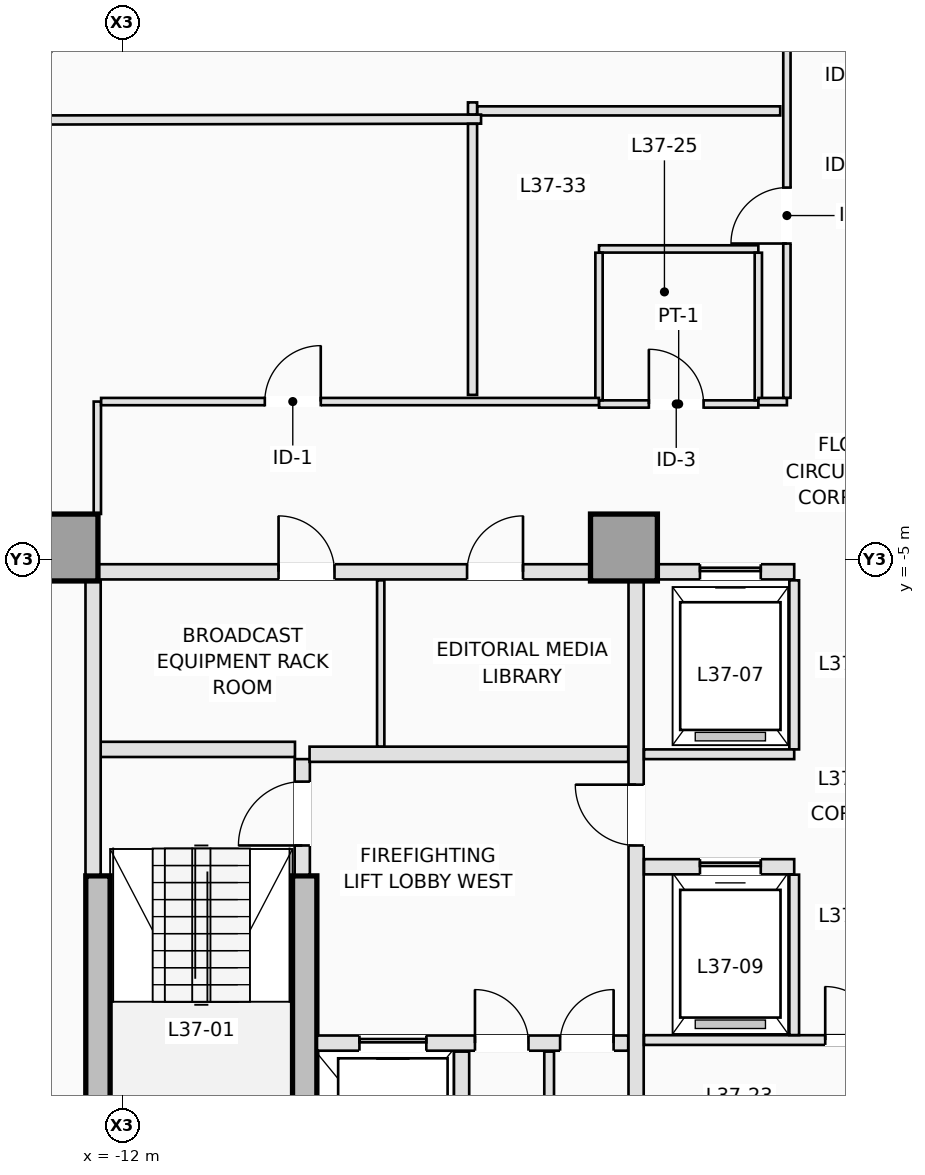
"""IFC4 building model, lengths in metres.
Left out: names, types, materials, properties, quantities, classifications, styles, units other than length and angle.
Written with IfcOpenShell. Run it as: python <this file> out.ifc"""

import sys

from ifc_helpers import new_model, si_unit, direction, frame, frame_2d, origin, origin_2d, place, context, subcontext, project, spatial, rectangle, extrude, element, fill, save


model = new_model("IFC4")
c1 = context("Model", 3, precision=1e-05, world=origin(), true_north=direction((0.0, 1.0)))
c2 = subcontext(c1, "Body", "Model", "MODEL_VIEW")
j1 = project(units=[si_unit("LENGTHUNIT", "METRE"), si_unit("PLANEANGLEUNIT", "RADIAN")], contexts=[c1])
p1 = place(None, origin())
s1 = spatial("IfcSite", under=j1, at=p1, CompositionType="ELEMENT")
p2 = place(p1, origin())
s2 = spatial("IfcBuilding", under=s1, at=p2, CompositionType="ELEMENT")
p3 = place(p2, frame((0.0, 0.0, 137.0)))
s3 = spatial("IfcBuildingStorey", under=s2, at=p3, CompositionType="ELEMENT", Elevation=137.0)
p4 = place(p3, frame((-12.4, -15.7, 0.0), z_axis=(0.0, 0.0, 1.0), x_axis=(0.0, 1.0, 0.0)))
e1 = element("IfcWall", 1, at=p4, inside=s3, PredefinedType="SHEAR", context=c2, shape_type="SweptSolid", body=[
    extrude(rectangle(XDim=5.5, YDim=0.4, at=frame_2d((2.75, 0.0))), origin(), (0.0, 0.0, 1.0), 3.5),
])
p5 = place(p3, frame((-9.0, -16.15, 0.0), z_axis=(0.0, 0.0, 1.0), x_axis=(0.0, 1.0, 0.0)))
e2 = element("IfcWall", 2, at=p5, inside=s3, PredefinedType="SHEAR", context=c2, shape_type="SweptSolid", body=[
    extrude(rectangle(XDim=5.95, YDim=0.4, at=frame_2d((2.975, 0.0))), origin(), (0.0, 0.0, 1.0), 3.5),
])
for number, where, z_axis, x_axis in (
    (3, (-12.95, -4.8, 0.0), (0.0, 0.0, 1.0), (1.0, 0.0, 0.0)),
    (4, (-3.75, -4.8, 0.0), (0.0, 0.0, 1.0), (1.0, 0.0, 0.0)),
):
    element("IfcColumn", number, at=place(p3, frame(where, z_axis=z_axis, x_axis=x_axis)), inside=s3, PredefinedType="COLUMN", context=c2, shape_type="SweptSolid", body=[
        extrude(rectangle(XDim=1.1, YDim=1.1, at=origin_2d()), origin(), (0.0, 0.0, 1.0), 3.5),
    ])
p6 = place(p3, frame((-15.383, -0.305, 0.0), z_axis=(0.0, 0.0, 1.0), x_axis=(0.490232095789, 0.871591929895, 0.0)))
e5 = element("IfcWall", 5, at=p6, inside=s3, PredefinedType="STANDARD", context=c2, shape_type="SweptSolid", body=[
    extrude(rectangle(XDim=4.375, YDim=0.28, at=frame_2d((2.188, 0.0))), origin(), (0.0, 0.0, 1.0), 3.25),
])
p7 = place(p3, frame((-9.04, -10.18, 0.0), z_axis=(0.0, 0.0, 1.0), x_axis=(0.0, 1.0, 0.0)))
e6 = element("IfcWall", 6, at=p7, inside=s3, PredefinedType="PARTITIONING", context=c2, shape_type="SweptSolid", body=[
    extrude(rectangle(XDim=1.9, YDim=0.25, at=frame_2d((0.95, 0.0))), origin(), (0.0, 0.0, 1.0), 3.25),
])
p8 = place(p7, frame((0.48, 0.0, 0.0)))
e7 = element("IfcOpeningElement", 7, at=p8, cuts=e6, PredefinedType="OPENING", context=c2, shape_type="SweptSolid", body=[
    extrude(rectangle(XDim=1.05, YDim=2.15, at=frame_2d((0.525, 1.075))), frame((0.0, 0.135, 0.0), z_axis=(0.0, -1.0, 0.0), x_axis=(1.0, 0.0, 0.0)), (0.0, 0.0, 1.0), 0.27),
])
p9 = place(p3, frame((-12.38, -8.12, 0.0), z_axis=(0.0, 0.0, 1.0), x_axis=(1.0, 0.0, 0.0)))
e8 = element("IfcWall", 8, at=p9, inside=s3, PredefinedType="PARTITIONING", context=c2, shape_type="SweptSolid", body=[
    extrude(rectangle(XDim=3.22, YDim=0.25, at=frame_2d((1.61, 0.0))), origin(), (0.0, 0.0, 1.0), 3.25),
])
p10 = place(p3, frame((-12.48, -10.18, 0.0), z_axis=(0.0, 0.0, 1.0), x_axis=(0.0, 1.0, 0.0)))
e9 = element("IfcWall", 9, at=p10, inside=s3, PredefinedType="PARTITIONING", context=c2, shape_type="SweptSolid", body=[
    extrude(rectangle(XDim=4.828, YDim=0.25, at=frame_2d((2.414, 0.0))), origin(), (0.0, 0.0, 1.0), 3.25),
])
p11 = place(p3, frame((-8.798, -12.95, 0.0), z_axis=(0.0, 0.0, 1.0), x_axis=(1.0, 0.0, 0.0)))
e10 = element("IfcWall", 10, at=p11, inside=s3, PredefinedType="PARTITIONING", context=c2, shape_type="SweptSolid", body=[
    extrude(rectangle(XDim=5.118, YDim=0.25, at=frame_2d((2.559, 0.0))), origin(), (0.0, 0.0, 1.0), 3.25),
])
p12 = place(p11, frame((0.698, 0.0, 0.0)))
e11 = element("IfcOpeningElement", 11, at=p12, cuts=e10, PredefinedType="OPENING", context=c2, shape_type="SweptSolid", body=[
    extrude(rectangle(XDim=1.1, YDim=2.15, at=frame_2d((0.55, 1.075))), frame((0.0, 0.135, 0.0), z_axis=(0.0, -1.0, 0.0), x_axis=(1.0, 0.0, 0.0)), (0.0, 0.0, 1.0), 0.27),
])
p13 = place(p11, frame((2.598, 0.0, 0.0)))
e12 = element("IfcOpeningElement", 12, at=p13, cuts=e10, PredefinedType="OPENING", context=c2, shape_type="SweptSolid", body=[
    extrude(rectangle(XDim=0.88, YDim=2.1, at=frame_2d((0.44, 1.05))), frame((0.0, 0.135, 0.0), z_axis=(0.0, -1.0, 0.0), x_axis=(1.0, 0.0, 0.0)), (0.0, 0.0, 1.0), 0.27),
])
p14 = place(p11, frame((3.998, 0.0, 0.0)))
e13 = element("IfcOpeningElement", 13, at=p14, cuts=e10, PredefinedType="OPENING", context=c2, shape_type="SweptSolid", body=[
    extrude(rectangle(XDim=0.88, YDim=2.1, at=frame_2d((0.44, 1.05))), frame((0.0, 0.135, 0.0), z_axis=(0.0, -1.0, 0.0), x_axis=(1.0, 0.0, 0.0)), (0.0, 0.0, 1.0), 0.27),
])
p15 = place(p3, frame((-6.42, -15.92, 0.0), z_axis=(0.0, 0.0, 1.0), x_axis=(0.0, 1.0, 0.0)))
e14 = element("IfcWall", 14, at=p15, inside=s3, PredefinedType="PARTITIONING", context=c2, shape_type="SweptSolid", body=[
    extrude(rectangle(XDim=2.83, YDim=0.25, at=frame_2d((1.415, 0.0))), origin(), (0.0, 0.0, 1.0), 3.25),
])
p16 = place(p3, frame((-4.98, -15.92, 0.0), z_axis=(0.0, 0.0, 1.0), x_axis=(0.0, 1.0, 0.0)))
e15 = element("IfcWall", 15, at=p16, inside=s3, PredefinedType="PARTITIONING", context=c2, shape_type="SweptSolid", body=[
    extrude(rectangle(XDim=2.83, YDim=0.16, at=frame_2d((1.415, 0.0))), origin(), (0.0, 0.0, 1.0), 3.25),
])
p17 = place(p3, frame((-8.92, -8.2, 0.0), z_axis=(0.0, 0.0, 1.0), x_axis=(1.0, 0.0, 0.0)))
e16 = element("IfcWall", 16, at=p17, inside=s3, PredefinedType="PARTITIONING", context=c2, shape_type="SweptSolid", body=[
    extrude(rectangle(XDim=5.24, YDim=0.25, at=frame_2d((2.62, 0.0))), origin(), (0.0, 0.0, 1.0), 3.25),
])
p18 = place(p3, frame((-3.55, -15.798, 0.0), z_axis=(0.0, 0.0, 1.0), x_axis=(0.0, 1.0, 0.0)))
e17 = element("IfcWall", 17, at=p18, inside=s3, PredefinedType="PARTITIONING", context=c2, shape_type="SweptSolid", body=[
    extrude(rectangle(XDim=10.446, YDim=0.25, at=frame_2d((5.223, 0.0))), origin(), (0.0, 0.0, 1.0), 3.25),
])
p19 = place(p18, frame((6.098, 0.0, 0.0)))
e18 = element("IfcOpeningElement", 18, at=p19, cuts=e17, PredefinedType="OPENING", context=c2, shape_type="SweptSolid", body=[
    extrude(rectangle(XDim=1.0, YDim=2.15, at=frame_2d((0.5, 1.075))), frame((0.0, 0.135, 0.0), z_axis=(0.0, -1.0, 0.0), x_axis=(1.0, 0.0, 0.0)), (0.0, 0.0, 1.0), 0.27),
])
p20 = place(p3, frame((-12.398, -5.2, 0.0), z_axis=(0.0, 0.0, 1.0), x_axis=(1.0, 0.0, 0.0)))
e19 = element("IfcWall", 19, at=p20, inside=s3, PredefinedType="PARTITIONING", context=c2, shape_type="SweptSolid", body=[
    extrude(rectangle(XDim=8.096, YDim=0.25, at=frame_2d((4.048, 0.0))), origin(), (0.0, 0.0, 1.0), 3.25),
])
p21 = place(p20, frame((2.968, 0.0, 0.0)))
e20 = element("IfcOpeningElement", 20, at=p21, cuts=e19, PredefinedType="OPENING", context=c2, shape_type="SweptSolid", body=[
    extrude(rectangle(XDim=0.92, YDim=2.12, at=frame_2d((0.46, 1.06))), frame((0.0, 0.135, 0.0), z_axis=(0.0, -1.0, 0.0), x_axis=(1.0, 0.0, 0.0)), (0.0, 0.0, 1.0), 0.27),
])
p22 = place(p20, frame((6.068, 0.0, 0.0)))
e21 = element("IfcOpeningElement", 21, at=p22, cuts=e19, PredefinedType="OPENING", context=c2, shape_type="SweptSolid", body=[
    extrude(rectangle(XDim=0.92, YDim=2.12, at=frame_2d((0.46, 1.06))), frame((0.0, 0.135, 0.0), z_axis=(0.0, -1.0, 0.0), x_axis=(1.0, 0.0, 0.0)), (0.0, 0.0, 1.0), 0.27),
])
p23 = place(p3, frame((-3.198, -5.2, 0.0), z_axis=(0.0, 0.0, 1.0), x_axis=(1.0, 0.0, 0.0)))
e22 = element("IfcWall", 22, at=p23, inside=s3, PredefinedType="PARTITIONING", context=c2, shape_type="SweptSolid", body=[
    extrude(rectangle(XDim=2.248, YDim=0.25, at=frame_2d((1.124, 0.0))), origin(), (0.0, 0.0, 1.0), 3.25),
])
p24 = place(p23, frame((0.698, 0.0, 0.0)))
e23 = element("IfcOpeningElement", 23, at=p24, cuts=e22, PredefinedType="OPENING", context=c2, shape_type="SweptSolid", body=[
    extrude(rectangle(XDim=1.0, YDim=2.15, at=frame_2d((0.5, 1.075))), frame((0.0, 0.135, 0.0), z_axis=(0.0, -1.0, 0.0), x_axis=(1.0, 0.0, 0.0)), (0.0, 0.0, 1.0), 0.27),
])
p25 = place(p3, frame((-7.75, -8.073, 0.0), z_axis=(0.0, 0.0, 1.0), x_axis=(0.0, 1.0, 0.0)))
e24 = element("IfcWall", 24, at=p25, inside=s3, PredefinedType="PARTITIONING", context=c2, shape_type="SweptSolid", body=[
    extrude(rectangle(XDim=2.733, YDim=0.12, at=frame_2d((1.366, 0.0))), origin(), (0.0, 0.0, 1.0), 3.25),
])
p26 = place(p3, frame((-0.95, -8.12, 0.0), z_axis=(0.0, 0.0, 1.0), x_axis=(0.0, 1.0, 0.0)))
e25 = element("IfcWall", 25, at=p26, inside=s3, PredefinedType="PARTITIONING", context=c2, shape_type="SweptSolid", body=[
    extrude(rectangle(XDim=2.78, YDim=0.16, at=frame_2d((1.39, 0.0))), origin(), (0.0, 0.0, 1.0), 3.25),
])
p27 = place(p3, frame((-3.42, -8.2, 0.0), z_axis=(0.0, 0.0, 1.0), x_axis=(1.0, 0.0, 0.0)))
e26 = element("IfcWall", 26, at=p27, inside=s3, PredefinedType="PARTITIONING", context=c2, shape_type="SweptSolid", body=[
    extrude(rectangle(XDim=2.47, YDim=0.16, at=frame_2d((1.235, 0.0))), origin(), (0.0, 0.0, 1.0), 3.25),
])
p28 = place(p3, frame((-3.42, -10.05, 0.0), z_axis=(0.0, 0.0, 1.0), x_axis=(1.0, 0.0, 0.0)))
e27 = element("IfcWall", 27, at=p28, inside=s3, PredefinedType="PARTITIONING", context=c2, shape_type="SweptSolid", body=[
    extrude(rectangle(XDim=2.47, YDim=0.25, at=frame_2d((1.235, 0.0))), origin(), (0.0, 0.0, 1.0), 3.25),
])
p29 = place(p28, frame((0.92, 0.0, 0.0)))
e28 = element("IfcOpeningElement", 28, at=p29, cuts=e27, PredefinedType="OPENING", context=c2, shape_type="SweptSolid", body=[
    extrude(rectangle(XDim=1.0, YDim=2.15, at=frame_2d((0.5, 1.075))), frame((0.0, 0.135, 0.0), z_axis=(0.0, -1.0, 0.0), x_axis=(1.0, 0.0, 0.0)), (0.0, 0.0, 1.0), 0.27),
])
p30 = place(p3, frame((-3.42, -12.9, 0.0), z_axis=(0.0, 0.0, 1.0), x_axis=(1.0, 0.0, 0.0)))
e29 = element("IfcWall", 29, at=p30, inside=s3, PredefinedType="PARTITIONING", context=c2, shape_type="SweptSolid", body=[
    extrude(rectangle(XDim=6.84, YDim=0.16, at=frame_2d((3.42, 0.0))), origin(), (0.0, 0.0, 1.0), 3.25),
])
p31 = place(p30, frame((2.98, 0.0, 0.0)))
e30 = element("IfcOpeningElement", 30, at=p31, cuts=e29, PredefinedType="OPENING", context=c2, shape_type="SweptSolid", body=[
    extrude(rectangle(XDim=0.88, YDim=2.12, at=frame_2d((0.44, 1.06))), frame((0.0, 0.09, 0.0), z_axis=(0.0, -1.0, 0.0), x_axis=(1.0, 0.0, 0.0)), (0.0, 0.0, 1.0), 0.18),
])
p32 = place(p3, frame((-0.95, -12.818, 0.0), z_axis=(0.0, 0.0, 1.0), x_axis=(0.0, 1.0, 0.0)))
e31 = element("IfcWall", 31, at=p32, inside=s3, PredefinedType="PARTITIONING", context=c2, shape_type="SweptSolid", body=[
    extrude(rectangle(XDim=2.638, YDim=0.16, at=frame_2d((1.319, 0.0))), origin(), (0.0, 0.0, 1.0), 3.25),
])
p33 = place(p3, frame((-4.16, -2.44, 0.0), z_axis=(0.0, 0.0, 1.0), x_axis=(1.0, 0.0, 0.0)))
e32 = element("IfcWall", 32, at=p33, inside=s3, PredefinedType="PARTITIONING", context=c2, shape_type="SweptSolid", body=[
    extrude(rectangle(XDim=2.62, YDim=0.12, at=frame_2d((1.31, 0.0))), origin(), (0.0, 0.0, 1.0), 2.891),
])
p34 = place(p33, frame((0.82, 0.0, 0.0)))
e33 = element("IfcOpeningElement", 33, at=p34, cuts=e32, PredefinedType="OPENING", context=c2, shape_type="SweptSolid", body=[
    extrude(rectangle(XDim=0.9, YDim=2.12, at=frame_2d((0.45, 1.06))), frame((0.0, 0.07, 0.0), z_axis=(0.0, -1.0, 0.0), x_axis=(1.0, 0.0, 0.0)), (0.0, 0.0, 1.0), 0.14),
])
p35 = place(p3, frame((-4.16, 0.11, 0.0), z_axis=(0.0, 0.0, 1.0), x_axis=(1.0, 0.0, 0.0)))
e34 = element("IfcWall", 34, at=p35, inside=s3, PredefinedType="PARTITIONING", context=c2, shape_type="SweptSolid", body=[
    extrude(rectangle(XDim=2.62, YDim=0.12, at=frame_2d((1.31, 0.0))), origin(), (0.0, 0.0, 1.0), 3.25),
])
for number, where, z_axis, x_axis in (
    (35, (-4.16, -2.378, 0.0), (0.0, 0.0, 1.0), (0.0, 1.0, 0.0)),
    (36, (-1.54, -2.378, 0.0), (0.0, 0.0, 1.0), (0.0, 1.0, 0.0)),
):
    element("IfcWall", number, at=place(p3, frame(where, z_axis=z_axis, x_axis=x_axis)), inside=s3, PredefinedType="PARTITIONING", context=c2, shape_type="SweptSolid", body=[
        extrude(rectangle(XDim=2.426, YDim=0.12, at=frame_2d((1.213, 0.0))), origin(), (0.0, 0.0, 1.0), 3.25),
    ])
p36 = place(p3, frame((-12.41, -4.248, 0.0), z_axis=(0.0, 0.0, 1.0), x_axis=(0.0, 1.0, 0.0)))
e37 = element("IfcWall", 37, at=p36, inside=s3, PredefinedType="PARTITIONING", context=c2, shape_type="SweptSolid", body=[
    extrude(rectangle(XDim=1.848, YDim=0.12, at=frame_2d((0.924, 0.0))), origin(), (0.0, 0.0, 1.0), 3.25),
])
p37 = place(p3, frame((-12.348, -2.4, 0.0), z_axis=(0.0, 0.0, 1.0), x_axis=(1.0, 0.0, 0.0)))
e38 = element("IfcWall", 38, at=p37, inside=s3, PredefinedType="PARTITIONING", context=c2, shape_type="SweptSolid", body=[
    extrude(rectangle(XDim=8.186, YDim=0.12, at=frame_2d((4.093, 0.0))), origin(), (0.0, 0.0, 1.0), 2.891),
])
p38 = place(p37, frame((2.692, 0.0, 0.0)))
e39 = element("IfcOpeningElement", 39, at=p38, cuts=e38, PredefinedType="OPENING", context=c2, shape_type="SweptSolid", body=[
    extrude(rectangle(XDim=0.92, YDim=2.12, at=frame_2d((0.46, 1.06))), frame((0.0, 0.07, 0.0), z_axis=(0.0, -1.0, 0.0), x_axis=(1.0, 0.0, 0.0)), (0.0, 0.0, 1.0), 0.14),
])
p39 = place(p3, frame((-1.538, -2.4, 0.0), z_axis=(0.0, 0.0, 1.0), x_axis=(1.0, 0.0, 0.0)))
e40 = element("IfcWall", 40, at=p39, inside=s3, PredefinedType="PARTITIONING", context=c2, shape_type="SweptSolid", body=[
    extrude(rectangle(XDim=0.468, YDim=0.12, at=frame_2d((0.234, 0.0))), origin(), (0.0, 0.0, 1.0), 2.891),
])
p40 = place(p3, frame((-1.07, -2.338, 0.0), z_axis=(0.0, 0.0, 1.0), x_axis=(0.0, 1.0, 0.0)))
e41 = element("IfcWall", 41, at=p40, inside=s3, PredefinedType="PARTITIONING", context=c2, shape_type="SweptSolid", body=[
    extrude(rectangle(XDim=13.488, YDim=0.12, at=frame_2d((6.744, 0.0))), origin(), (0.0, 0.0, 1.0), 3.25),
])
p41 = place(p40, frame((10.646, 0.0, 0.0)))
e42 = element("IfcOpeningElement", 42, at=p41, cuts=e41, PredefinedType="OPENING", context=c2, shape_type="SweptSolid", body=[
    extrude(rectangle(XDim=0.92, YDim=2.12, at=frame_2d((0.46, 1.06))), frame((0.0, 0.07, 0.0), z_axis=(0.0, -1.0, 0.0), x_axis=(1.0, 0.0, 0.0)), (0.0, 0.0, 1.0), 0.14),
])
p42 = place(p40, frame((6.391, 0.0, 0.0)))
e43 = element("IfcOpeningElement", 43, at=p42, cuts=e41, PredefinedType="OPENING", context=c2, shape_type="SweptSolid", body=[
    extrude(rectangle(XDim=0.92, YDim=2.12, at=frame_2d((0.46, 1.06))), frame((0.0, 0.07, 0.0), z_axis=(0.0, -1.0, 0.0), x_axis=(1.0, 0.0, 0.0)), (0.0, 0.0, 1.0), 0.14),
])
p43 = place(p40, frame((2.537, 0.0, 0.0)))
e44 = element("IfcOpeningElement", 44, at=p43, cuts=e41, PredefinedType="OPENING", context=c2, shape_type="SweptSolid", body=[
    extrude(rectangle(XDim=0.92, YDim=2.12, at=frame_2d((0.46, 1.06))), frame((0.0, 0.07, 0.0), z_axis=(0.0, -1.0, 0.0), x_axis=(1.0, 0.0, 0.0)), (0.0, 0.0, 1.0), 0.14),
])
p44 = place(p3, frame((-1.18, 2.38, 0.0), z_axis=(0.0, 0.0, 1.0), x_axis=(-1.0, 0.0, 0.0)))
e45 = element("IfcWall", 45, at=p44, inside=s3, PredefinedType="PARTITIONING", context=c2, shape_type="SweptSolid", body=[
    extrude(rectangle(XDim=4.985, YDim=0.15, at=frame_2d((2.492, 0.0))), origin(), (0.0, 0.0, 1.0), 3.25),
])
p45 = place(p3, frame((-6.1, 2.245, 0.0), z_axis=(0.0, 0.0, 1.0), x_axis=(-0.999998126996, -0.001935459776, 0.0)))
e46 = element("IfcWall", 46, at=p45, inside=s3, PredefinedType="PARTITIONING", context=c2, shape_type="SweptSolid", body=[
    extrude(rectangle(XDim=7.695, YDim=0.15, at=frame_2d((3.847, 0.0))), origin(), (0.0, 0.0, 1.0), 3.25),
])
p46 = place(p3, frame((-6.24, -2.29, 0.0), z_axis=(0.0, 0.0, 1.0), x_axis=(0.0, 1.0, 0.0)))
e47 = element("IfcWall", 47, at=p46, inside=s3, PredefinedType="PARTITIONING", context=c2, shape_type="SweptSolid", body=[
    extrude(rectangle(XDim=4.458, YDim=0.15, at=frame_2d((2.229, 0.0))), origin(), (0.0, 0.0, 1.0), 3.25),
])
p47 = place(p3, frame((-6.24, 2.321, 0.0), z_axis=(0.0, 0.0, 1.0), x_axis=(0.0, 1.0, 0.0)))
e48 = element("IfcWall", 48, at=p47, inside=s3, PredefinedType="PARTITIONING", context=c2, shape_type="SweptSolid", body=[
    extrude(rectangle(XDim=0.199, YDim=0.15, at=frame_2d((0.099, 0.0))), origin(), (0.0, 0.0, 1.0), 3.25),
])
p48 = place(p24, origin())
e49 = element("IfcDoor", 49, at=p48, inside=s3, OperationType="SLIDING_TO_LEFT", PredefinedType="DOOR", context=c2, shape_type="SweptSolid", body=[
    extrude(rectangle(XDim=1.0, YDim=2.15, at=frame_2d((0.5, 1.075))), frame((0.0, 0.025, 0.0), z_axis=(0.0, -1.0, 0.0), x_axis=(1.0, 0.0, 0.0)), (0.0, 0.0, 1.0), 0.05),
])
fill(e23, e49)
p49 = place(p12, origin())
e50 = element("IfcDoor", 50, at=p49, inside=s3, OperationType="SLIDING_TO_LEFT", PredefinedType="DOOR", context=c2, shape_type="SweptSolid", body=[
    extrude(rectangle(XDim=1.1, YDim=2.15, at=frame_2d((0.55, 1.075))), frame((0.0, 0.025, 0.0), z_axis=(0.0, -1.0, 0.0), x_axis=(1.0, 0.0, 0.0)), (0.0, 0.0, 1.0), 0.05),
])
fill(e11, e50)
p50 = place(p29, origin())
e51 = element("IfcDoor", 51, at=p50, inside=s3, OperationType="SLIDING_TO_LEFT", PredefinedType="DOOR", context=c2, shape_type="SweptSolid", body=[
    extrude(rectangle(XDim=1.0, YDim=2.15, at=frame_2d((0.5, 1.075))), frame((0.0, 0.025, 0.0), z_axis=(0.0, -1.0, 0.0), x_axis=(1.0, 0.0, 0.0)), (0.0, 0.0, 1.0), 0.05),
])
fill(e28, e51)
p51 = place(p8, origin())
e52 = element("IfcDoor", 52, at=p51, inside=s3, OperationType="SINGLE_SWING_LEFT", PredefinedType="DOOR", context=c2, shape_type="SweptSolid", body=[
    extrude(rectangle(XDim=1.05, YDim=2.15, at=frame_2d((0.525, 1.075))), frame((0.0, 0.025, 0.0), z_axis=(0.0, -1.0, 0.0), x_axis=(1.0, 0.0, 0.0)), (0.0, 0.0, 1.0), 0.05),
])
fill(e7, e52)
p52 = place(p13, origin())
e53 = element("IfcDoor", 53, at=p52, inside=s3, OperationType="SINGLE_SWING_LEFT", PredefinedType="TRAPDOOR", context=c2, shape_type="SweptSolid", body=[
    extrude(rectangle(XDim=0.88, YDim=2.1, at=frame_2d((0.44, 1.05))), frame((0.0, 0.025, 0.0), z_axis=(0.0, -1.0, 0.0), x_axis=(1.0, 0.0, 0.0)), (0.0, 0.0, 1.0), 0.05),
])
fill(e12, e53)
p53 = place(p14, origin())
e54 = element("IfcDoor", 54, at=p53, inside=s3, OperationType="SINGLE_SWING_RIGHT", PredefinedType="TRAPDOOR", context=c2, shape_type="SweptSolid", body=[
    extrude(rectangle(XDim=0.88, YDim=2.1, at=frame_2d((0.44, 1.05))), frame((0.0, 0.025, 0.0), z_axis=(0.0, -1.0, 0.0), x_axis=(1.0, 0.0, 0.0)), (0.0, 0.0, 1.0), 0.05),
])
fill(e13, e54)
p54 = place(p19, origin())
e55 = element("IfcDoor", 55, at=p54, inside=s3, OperationType="SINGLE_SWING_RIGHT", PredefinedType="DOOR", context=c2, shape_type="SweptSolid", body=[
    extrude(rectangle(XDim=1.0, YDim=2.15, at=frame_2d((0.5, 1.075))), frame((0.0, 0.025, 0.0), z_axis=(0.0, -1.0, 0.0), x_axis=(1.0, 0.0, 0.0)), (0.0, 0.0, 1.0), 0.05),
])
fill(e18, e55)
p55 = place(p21, origin())
e56 = element("IfcDoor", 56, at=p55, inside=s3, OperationType="SINGLE_SWING_LEFT", PredefinedType="DOOR", context=c2, shape_type="SweptSolid", body=[
    extrude(rectangle(XDim=0.92, YDim=2.12, at=frame_2d((0.46, 1.06))), frame((0.0, 0.025, 0.0), z_axis=(0.0, -1.0, 0.0), x_axis=(1.0, 0.0, 0.0)), (0.0, 0.0, 1.0), 0.05),
])
fill(e20, e56)
p56 = place(p22, origin())
e57 = element("IfcDoor", 57, at=p56, inside=s3, OperationType="SINGLE_SWING_RIGHT", PredefinedType="DOOR", context=c2, shape_type="SweptSolid", body=[
    extrude(rectangle(XDim=0.92, YDim=2.12, at=frame_2d((0.46, 1.06))), frame((0.0, 0.025, 0.0), z_axis=(0.0, -1.0, 0.0), x_axis=(1.0, 0.0, 0.0)), (0.0, 0.0, 1.0), 0.05),
])
fill(e21, e57)
p57 = place(p31, origin())
e58 = element("IfcDoor", 58, at=p57, inside=s3, OperationType="SINGLE_SWING_LEFT", PredefinedType="DOOR", context=c2, shape_type="SweptSolid", body=[
    extrude(rectangle(XDim=0.88, YDim=2.12, at=frame_2d((0.44, 1.06))), frame((0.0, 0.025, 0.0), z_axis=(0.0, -1.0, 0.0), x_axis=(1.0, 0.0, 0.0)), (0.0, 0.0, 1.0), 0.05),
])
fill(e30, e58)
p58 = place(p34, origin())
e59 = element("IfcDoor", 59, at=p58, inside=s3, OperationType="SINGLE_SWING_LEFT", PredefinedType="DOOR", context=c2, shape_type="SweptSolid", body=[
    extrude(rectangle(XDim=0.9, YDim=2.12, at=frame_2d((0.45, 1.06))), frame((0.0, 0.025, 0.0), z_axis=(0.0, -1.0, 0.0), x_axis=(1.0, 0.0, 0.0)), (0.0, 0.0, 1.0), 0.05),
])
fill(e33, e59)
p59 = place(p43, origin())
e60 = element("IfcDoor", 60, at=p59, inside=s3, OperationType="SINGLE_SWING_LEFT", PredefinedType="DOOR", context=c2, shape_type="SweptSolid", body=[
    extrude(rectangle(XDim=0.92, YDim=2.12, at=frame_2d((0.46, 1.06))), frame((0.0, 0.025, 0.0), z_axis=(0.0, -1.0, 0.0), x_axis=(1.0, 0.0, 0.0)), (0.0, 0.0, 1.0), 0.05),
])
fill(e44, e60)
p60 = place(p38, origin())
e61 = element("IfcDoor", 61, at=p60, inside=s3, OperationType="SINGLE_SWING_RIGHT", PredefinedType="DOOR", context=c2, shape_type="SweptSolid", body=[
    extrude(rectangle(XDim=0.92, YDim=2.12, at=frame_2d((0.46, 1.06))), frame((0.0, 0.025, 0.0), z_axis=(0.0, -1.0, 0.0), x_axis=(1.0, 0.0, 0.0)), (0.0, 0.0, 1.0), 0.05),
])
fill(e39, e61)
save(model, sys.argv[1])
